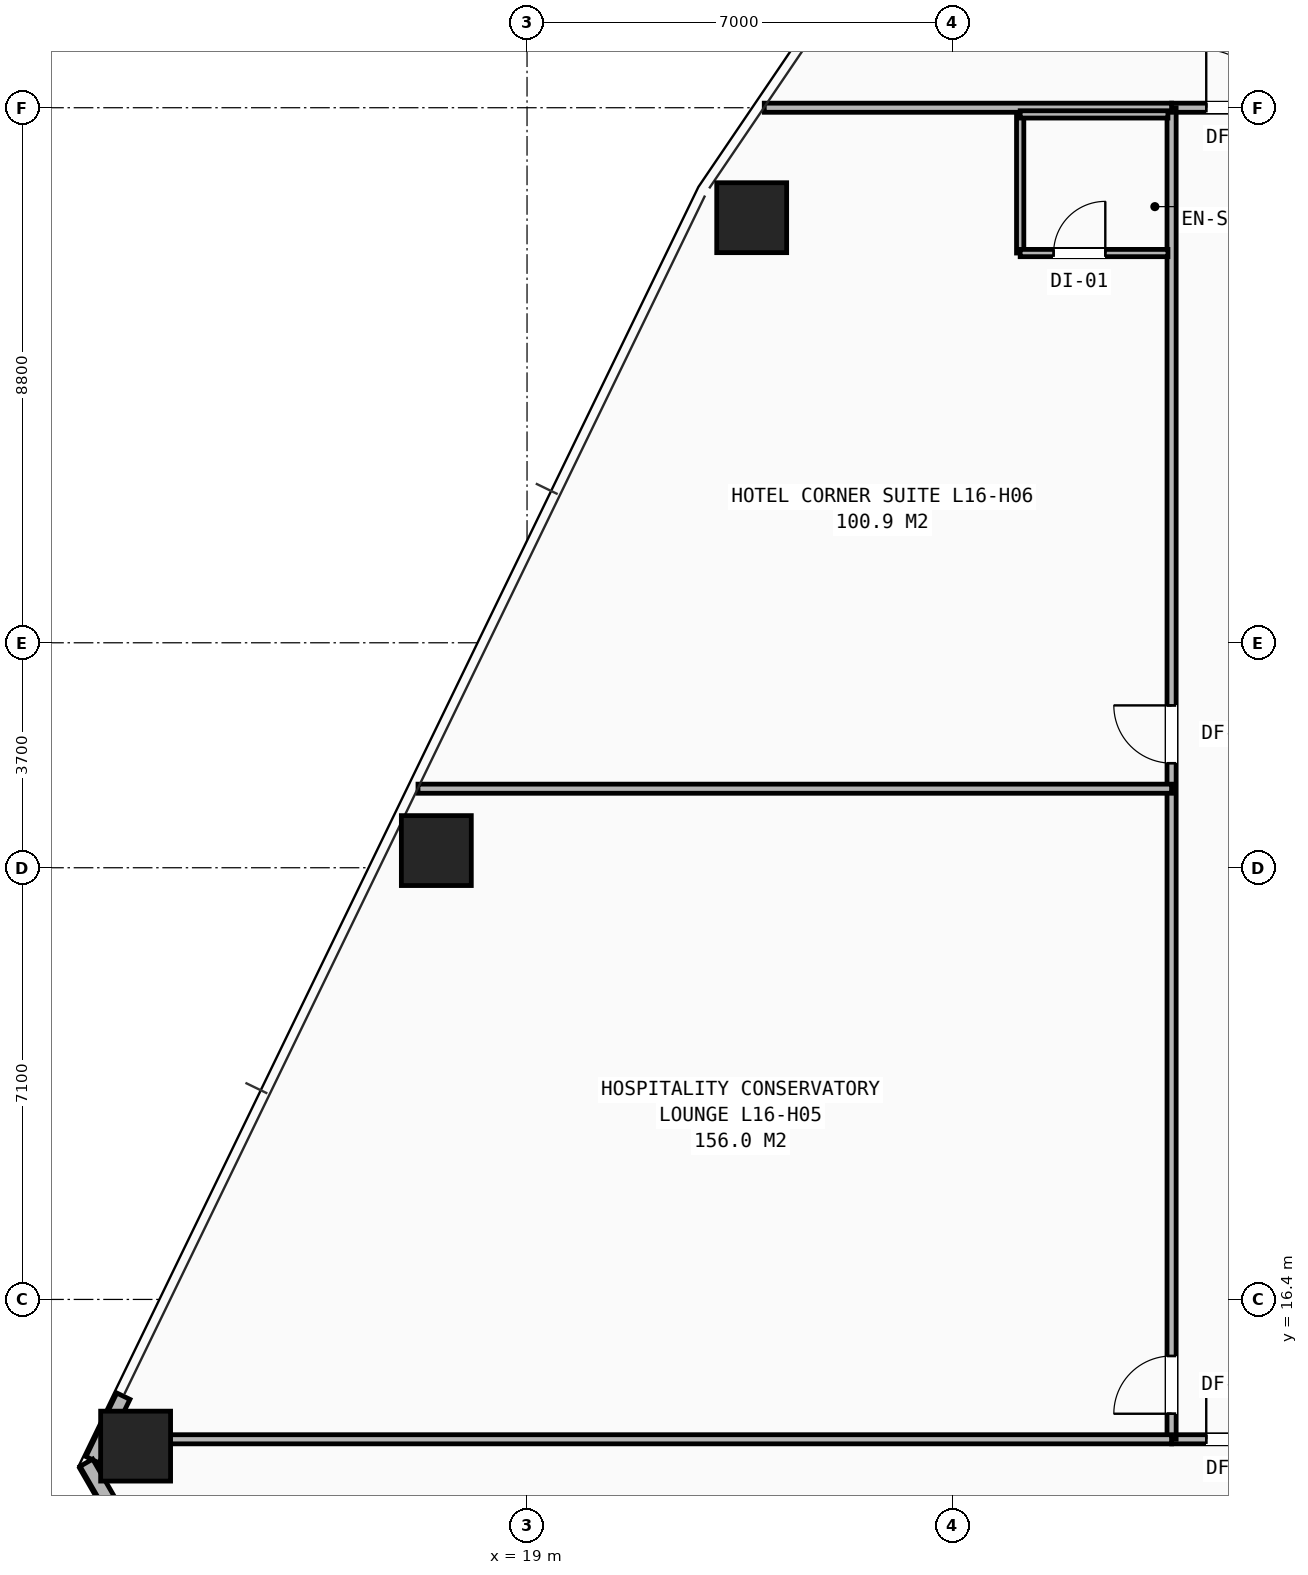
"""IFC4 building model, lengths in metres.
Left out: names, types, materials, properties, quantities, classifications, styles, units other than length and angle.
Written with IfcOpenShell. Run it as: python <this file> out.ifc"""

import sys

from ifc_helpers import new_model, si_unit, direction, frame, frame_2d, origin, origin_2d, place, context, subcontext, project, spatial, rectangle, hollow_rectangle, extrude, element, fill, save


model = new_model("IFC4")
c1 = context("Model", 3, precision=1e-05, world=origin(), true_north=direction((0.0, 1.0)))
c2 = subcontext(c1, "Body", "Model", "MODEL_VIEW")
j1 = project(units=[si_unit("LENGTHUNIT", "METRE"), si_unit("PLANEANGLEUNIT", "RADIAN")], contexts=[c1])
p1 = place(None, origin())
s1 = spatial("IfcSite", under=j1, at=p1, CompositionType="ELEMENT")
p2 = place(p1, origin())
s2 = spatial("IfcBuilding", under=s1, at=p2, CompositionType="ELEMENT")
p3 = place(p2, frame((0.0, 0.0, 59.2)))
s3 = spatial("IfcBuildingStorey", under=s2, at=p3, CompositionType="ELEMENT", Elevation=59.2)
for number, where, z_axis, x_axis in (
    (1, (22.695, 34.191, 0.0), (0.0, 0.0, 1.0), (1.0, 0.0, 0.0)),
    (2, (17.508, 23.782, 0.0), (0.0, 0.0, 1.0), (1.0, 0.0, 0.0)),
    (3, (12.563, 13.988, 0.0), (0.0, 0.0, 1.0), (1.0, 0.0, 0.0)),
):
    element("IfcColumn", number, at=place(p3, frame(where, z_axis=z_axis, x_axis=x_axis)), inside=s3, PredefinedType="COLUMN", context=c2, shape_type="SweptSolid", body=[
        extrude(hollow_rectangle(XDim=1.15, YDim=1.15, WallThickness=0.075, at=origin_2d()), origin(), (0.0, 0.0, 1.0), 3.2),
    ])
p4 = place(p3, frame((12.361, 14.809, 0.0), z_axis=(0.0, 0.0, 1.0), x_axis=(-0.436005533542, -0.899943984213, 0.0)))
e4 = element("IfcWall", 4, at=p4, inside=s3, PredefinedType="SHEAR", context=c2, shape_type="SweptSolid", body=[
    extrude(rectangle(XDim=1.162, YDim=0.24, at=frame_2d((0.581, 0.0))), origin(), (0.0, 0.0, 1.0), 2.263),
])
p5 = place(p3, frame((16.796, 4.98, 0.0), z_axis=(0.0, 0.0, 1.0), x_axis=(-0.499984376209, 0.866034423996, 0.0)))
e5 = element("IfcWall", 5, at=p5, inside=s3, PredefinedType="SHEAR", context=c2, shape_type="SweptSolid", body=[
    extrude(rectangle(XDim=10.086, YDim=0.24, at=frame_2d((5.043, 0.0))), origin(), (0.0, 0.0, 1.0), 2.263),
])
p6 = place(p3, frame((29.6, 14.1, 0.0), z_axis=(0.0, 0.0, 1.0), x_axis=(1.0, 0.0, 0.0)))
e6 = element("IfcWall", 6, at=p6, inside=s3, PredefinedType="PARTITIONING", context=c2, shape_type="SweptSolid", body=[
    extrude(rectangle(XDim=20.8, YDim=0.15, at=frame_2d((10.4, 0.0))), origin(), (0.0, 0.0, 1.0), 2.191),
])
p7 = place(p6, frame((0.57, 0.0, 0.0)))
e7 = element("IfcOpeningElement", 7, at=p7, cuts=e6, PredefinedType="OPENING", context=c2, shape_type="SweptSolid", body=[
    extrude(rectangle(XDim=0.95, YDim=2.1, at=frame_2d((0.475, 1.05))), frame((0.0, 0.085, 0.0), z_axis=(0.0, -1.0, 0.0), x_axis=(1.0, 0.0, 0.0)), (0.0, 0.0, 1.0), 0.17),
])
p8 = place(p6, frame((4.82, 0.0, 0.0)))
e8 = element("IfcOpeningElement", 8, at=p8, cuts=e6, PredefinedType="OPENING", context=c2, shape_type="SweptSolid", body=[
    extrude(rectangle(XDim=0.95, YDim=2.1, at=frame_2d((0.475, 1.05))), frame((0.0, 0.085, 0.0), z_axis=(0.0, -1.0, 0.0), x_axis=(1.0, 0.0, 0.0)), (0.0, 0.0, 1.0), 0.17),
])
p9 = place(p6, frame((10.82, 0.0, 0.0)))
e9 = element("IfcOpeningElement", 9, at=p9, cuts=e6, PredefinedType="OPENING", context=c2, shape_type="SweptSolid", body=[
    extrude(rectangle(XDim=0.95, YDim=2.1, at=frame_2d((0.475, 1.05))), frame((0.0, 0.085, 0.0), z_axis=(0.0, -1.0, 0.0), x_axis=(1.0, 0.0, 0.0)), (0.0, 0.0, 1.0), 0.17),
])
p10 = place(p6, frame((16.82, 0.0, 0.0)))
e10 = element("IfcOpeningElement", 10, at=p10, cuts=e6, PredefinedType="OPENING", context=c2, shape_type="SweptSolid", body=[
    extrude(rectangle(XDim=0.95, YDim=2.1, at=frame_2d((0.475, 1.05))), frame((0.0, 0.085, 0.0), z_axis=(0.0, -1.0, 0.0), x_axis=(1.0, 0.0, 0.0)), (0.0, 0.0, 1.0), 0.17),
])
p11 = place(p3, frame((29.6, 36.0, 0.0), z_axis=(0.0, 0.0, 1.0), x_axis=(1.0, 0.0, 0.0)))
e11 = element("IfcWall", 11, at=p11, inside=s3, PredefinedType="PARTITIONING", context=c2, shape_type="SweptSolid", body=[
    extrude(rectangle(XDim=9.65, YDim=0.15, at=frame_2d((4.825, 0.0))), origin(), (0.0, 0.0, 1.0), 2.98),
])
p12 = place(p11, frame((0.57, 0.0, 0.0)))
e12 = element("IfcOpeningElement", 12, at=p12, cuts=e11, PredefinedType="OPENING", context=c2, shape_type="SweptSolid", body=[
    extrude(rectangle(XDim=0.95, YDim=2.1, at=frame_2d((0.475, 1.05))), frame((0.0, 0.085, 0.0), z_axis=(0.0, -1.0, 0.0), x_axis=(1.0, 0.0, 0.0)), (0.0, 0.0, 1.0), 0.17),
])
p13 = place(p11, frame((8.02, 0.0, 0.0)))
e13 = element("IfcOpeningElement", 13, at=p13, cuts=e11, PredefinedType="OPENING", context=c2, shape_type="SweptSolid", body=[
    extrude(rectangle(XDim=0.95, YDim=2.1, at=frame_2d((0.475, 1.05))), frame((0.0, 0.085, 0.0), z_axis=(0.0, -1.0, 0.0), x_axis=(1.0, 0.0, 0.0)), (0.0, 0.0, 1.0), 0.17),
])
p14 = place(p3, frame((29.6, 14.1, 0.0), z_axis=(0.0, 0.0, 1.0), x_axis=(0.0, 1.0, 0.0)))
e14 = element("IfcWall", 14, at=p14, inside=s3, PredefinedType="PARTITIONING", context=c2, shape_type="SweptSolid", body=[
    extrude(rectangle(XDim=21.9, YDim=0.15, at=frame_2d((10.95, 0.0))), origin(), (0.0, 0.0, 1.0), 2.191),
])
p15 = place(p14, frame((0.42, 0.0, 0.0)))
e15 = element("IfcOpeningElement", 15, at=p15, cuts=e14, PredefinedType="OPENING", context=c2, shape_type="SweptSolid", body=[
    extrude(rectangle(XDim=0.95, YDim=2.1, at=frame_2d((0.475, 1.05))), frame((0.0, 0.085, 0.0), z_axis=(0.0, -1.0, 0.0), x_axis=(1.0, 0.0, 0.0)), (0.0, 0.0, 1.0), 0.17),
])
p16 = place(p14, frame((11.12, 0.0, 0.0)))
e16 = element("IfcOpeningElement", 16, at=p16, cuts=e14, PredefinedType="OPENING", context=c2, shape_type="SweptSolid", body=[
    extrude(rectangle(XDim=0.95, YDim=2.1, at=frame_2d((0.475, 1.05))), frame((0.0, 0.085, 0.0), z_axis=(0.0, -1.0, 0.0), x_axis=(1.0, 0.0, 0.0)), (0.0, 0.0, 1.0), 0.17),
])
p17 = place(p3, frame((12.023, 14.1, 0.0), z_axis=(0.0, 0.0, 1.0), x_axis=(1.0, 0.0, 0.0)))
e17 = element("IfcWall", 17, at=p17, inside=s3, PredefinedType="PARTITIONING", context=c2, shape_type="SweptSolid", body=[
    extrude(rectangle(XDim=17.577, YDim=0.15, at=frame_2d((8.789, 0.0))), origin(), (0.0, 0.0, 1.0), 2.191),
])
p18 = place(p3, frame((22.901, 36.0, 0.0), z_axis=(0.0, 0.0, 1.0), x_axis=(1.0, 0.0, 0.0)))
e18 = element("IfcWall", 18, at=p18, inside=s3, PredefinedType="PARTITIONING", context=c2, shape_type="SweptSolid", body=[
    extrude(rectangle(XDim=6.699, YDim=0.15, at=frame_2d((3.349, 0.0))), origin(), (0.0, 0.0, 1.0), 2.268),
])
p19 = place(p3, frame((17.207, 24.8, 0.0), z_axis=(0.0, 0.0, 1.0), x_axis=(1.0, 0.0, 0.0)))
e19 = element("IfcWall", 19, at=p19, inside=s3, PredefinedType="PARTITIONING", context=c2, shape_type="SweptSolid", body=[
    extrude(rectangle(XDim=12.393, YDim=0.15, at=frame_2d((6.197, 0.0))), origin(), (0.0, 0.0, 1.0), 2.268),
])
p20 = place(p3, frame((27.11, 33.61, 0.0), z_axis=(0.0, 0.0, 1.0), x_axis=(0.0, 1.0, 0.0)))
e20 = element("IfcWall", 20, at=p20, inside=s3, PredefinedType="PARTITIONING", context=c2, shape_type="SweptSolid", body=[
    extrude(rectangle(XDim=2.28, YDim=0.12, at=frame_2d((1.14, 0.0))), origin(), (0.0, 0.0, 1.0), 2.513),
])
p21 = place(p3, frame((27.11, 33.61, 0.0), z_axis=(0.0, 0.0, 1.0), x_axis=(1.0, 0.0, 0.0)))
e21 = element("IfcWall", 21, at=p21, inside=s3, PredefinedType="PARTITIONING", context=c2, shape_type="SweptSolid", body=[
    extrude(rectangle(XDim=2.43, YDim=0.12, at=frame_2d((1.215, 0.0))), origin(), (0.0, 0.0, 1.0), 2.513),
])
p22 = place(p21, frame((0.55, 0.0, 0.0)))
e22 = element("IfcOpeningElement", 22, at=p22, cuts=e21, PredefinedType="OPENING", context=c2, shape_type="SweptSolid", body=[
    extrude(rectangle(XDim=0.85, YDim=2.05, at=frame_2d((0.425, 1.025))), frame((0.0, 0.07, 0.0), z_axis=(0.0, -1.0, 0.0), x_axis=(1.0, 0.0, 0.0)), (0.0, 0.0, 1.0), 0.14),
])
p23 = place(p3, frame((27.11, 35.89, 0.0), z_axis=(0.0, 0.0, 1.0), x_axis=(1.0, 0.0, 0.0)))
e23 = element("IfcWall", 23, at=p23, inside=s3, PredefinedType="PARTITIONING", context=c2, shape_type="SweptSolid", body=[
    extrude(rectangle(XDim=2.43, YDim=0.12, at=frame_2d((1.215, 0.0))), origin(), (0.0, 0.0, 1.0), 2.513),
])
p24 = place(p7, origin())
e24 = element("IfcDoor", 24, at=p24, inside=s3, OperationType="SINGLE_SWING_LEFT", PredefinedType="DOOR", context=c2, shape_type="SweptSolid", body=[
    extrude(rectangle(XDim=0.95, YDim=2.1, at=frame_2d((0.475, 1.05))), frame((0.0, 0.025, 0.0), z_axis=(0.0, -1.0, 0.0), x_axis=(1.0, 0.0, 0.0)), (0.0, 0.0, 1.0), 0.05),
])
fill(e7, e24)
p25 = place(p15, origin())
e25 = element("IfcDoor", 25, at=p25, inside=s3, OperationType="SINGLE_SWING_LEFT", PredefinedType="DOOR", context=c2, shape_type="SweptSolid", body=[
    extrude(rectangle(XDim=0.95, YDim=2.1, at=frame_2d((0.475, 1.05))), frame((0.0, 0.025, 0.0), z_axis=(0.0, -1.0, 0.0), x_axis=(1.0, 0.0, 0.0)), (0.0, 0.0, 1.0), 0.05),
])
fill(e15, e25)
p26 = place(p16, origin())
e26 = element("IfcDoor", 26, at=p26, inside=s3, OperationType="SINGLE_SWING_RIGHT", PredefinedType="DOOR", context=c2, shape_type="SweptSolid", body=[
    extrude(rectangle(XDim=0.95, YDim=2.1, at=frame_2d((0.475, 1.05))), frame((0.0, 0.025, 0.0), z_axis=(0.0, -1.0, 0.0), x_axis=(1.0, 0.0, 0.0)), (0.0, 0.0, 1.0), 0.05),
])
fill(e16, e26)
p27 = place(p22, origin())
e27 = element("IfcDoor", 27, at=p27, inside=s3, OperationType="SINGLE_SWING_RIGHT", PredefinedType="DOOR", context=c2, shape_type="SweptSolid", body=[
    extrude(rectangle(XDim=0.85, YDim=2.05, at=frame_2d((0.425, 1.025))), frame((0.0, 0.025, 0.0), z_axis=(0.0, -1.0, 0.0), x_axis=(1.0, 0.0, 0.0)), (0.0, 0.0, 1.0), 0.05),
])
fill(e22, e27)
p28 = place(p12, origin())
e28 = element("IfcDoor", 28, at=p28, inside=s3, OperationType="SINGLE_SWING_LEFT", PredefinedType="DOOR", context=c2, shape_type="SweptSolid", body=[
    extrude(rectangle(XDim=0.95, YDim=2.1, at=frame_2d((0.475, 1.05))), frame((0.0, 0.025, 0.0), z_axis=(0.0, -1.0, 0.0), x_axis=(1.0, 0.0, 0.0)), (0.0, 0.0, 1.0), 0.05),
])
fill(e12, e28)
save(model, sys.argv[1])
